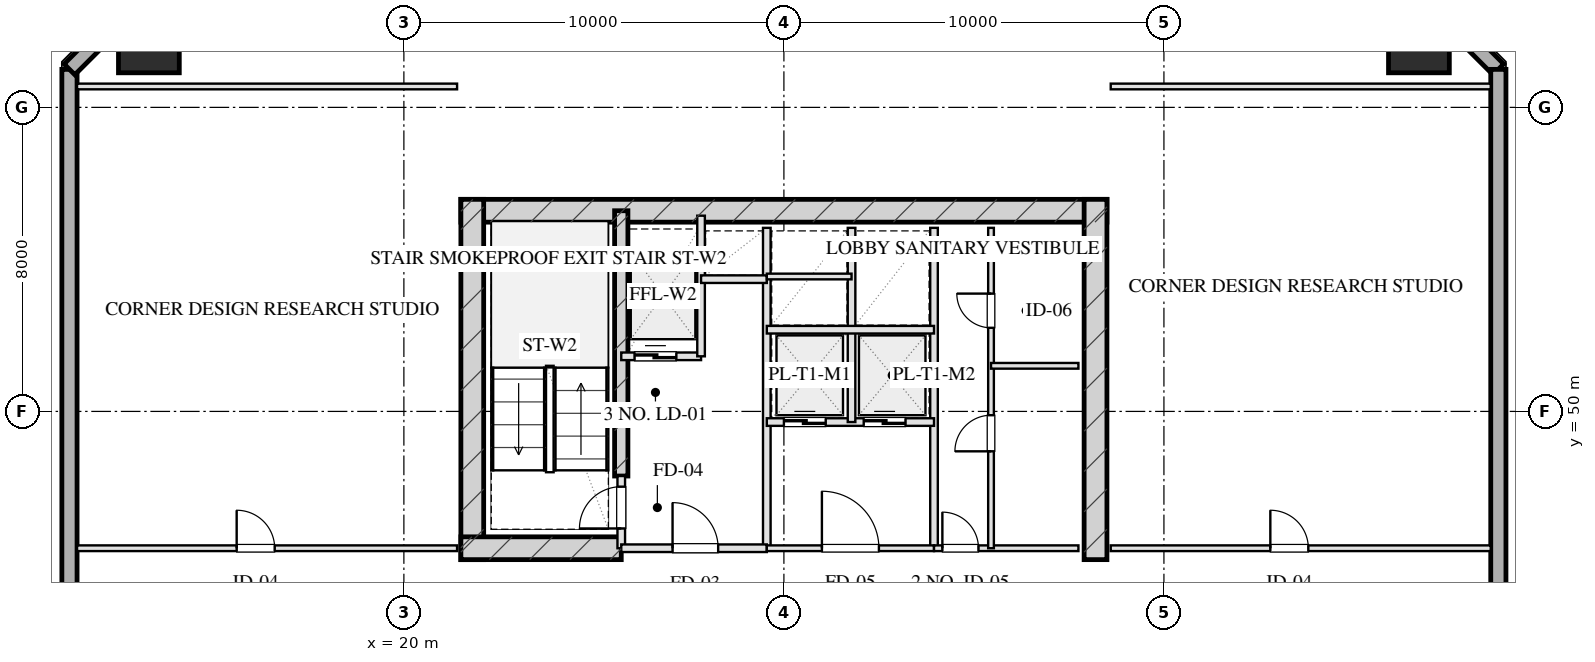
"""IFC4 building model, lengths in metres.
Left out: names, types, materials, properties, quantities, classifications, styles, units other than length and angle.
Written with IfcOpenShell. Run it as: python <this file> out.ifc"""

import sys

from ifc_helpers import new_model, si_unit, direction, frame, frame_2d, origin, origin_2d, place, context, subcontext, project, spatial, rectangle, hollow_rectangle, extrude, element, fill, save


model = new_model("IFC4")
c1 = context("Model", 3, precision=1e-05, world=origin(), true_north=direction((0.0, 1.0)))
c2 = subcontext(c1, "Body", "Model", "MODEL_VIEW")
j1 = project(units=[si_unit("LENGTHUNIT", "METRE"), si_unit("PLANEANGLEUNIT", "RADIAN")], contexts=[c1])
p1 = place(None, origin())
s1 = spatial("IfcSite", under=j1, at=p1, CompositionType="ELEMENT")
p2 = place(p1, origin())
s2 = spatial("IfcBuilding", under=s1, at=p2, CompositionType="ELEMENT")
p3 = place(p2, frame((0.0, 0.0, 127.65)))
s3 = spatial("IfcBuildingStorey", under=s2, at=p3, CompositionType="ELEMENT", Elevation=127.65)
p4 = place(p3, frame((21.5, 55.28, 0.0), z_axis=(0.0, 0.0, 1.0), x_axis=(1.0, 0.0, 0.0)))
e1 = element("IfcWall", 1, at=p4, inside=s3, PredefinedType="SHEAR", context=c2, shape_type="SweptSolid", body=[
    extrude(rectangle(XDim=17.0, YDim=0.6, at=frame_2d((8.5, 0.0))), origin(), (0.0, 0.0, 1.0), 3.45),
])
for number, where, z_axis, x_axis in (
    (2, (21.8, 46.1, 0.0), (0.0, 0.0, 1.0), (0.0, 1.0, 0.0)),
    (3, (38.2, 46.1, 0.0), (0.0, 0.0, 1.0), (0.0, 1.0, 0.0)),
):
    element("IfcWall", number, at=place(p3, frame(where, z_axis=z_axis, x_axis=x_axis)), inside=s3, PredefinedType="SHEAR", context=c2, shape_type="SweptSolid", body=[
        extrude(rectangle(XDim=9.48, YDim=0.6, at=frame_2d((4.74, 0.0))), origin(), (0.0, 0.0, 1.0), 3.45),
    ])
p5 = place(p3, frame((25.72, 48.3, 0.0), z_axis=(0.0, 0.0, 1.0), x_axis=(0.0, 1.0, 0.0)))
e4 = element("IfcWall", 4, at=p5, inside=s3, PredefinedType="SHEAR", context=c2, shape_type="SweptSolid", body=[
    extrude(rectangle(XDim=6.98, YDim=0.35, at=frame_2d((3.49, 0.0))), origin(), (0.0, 0.0, 1.0), 3.45),
])
p6 = place(p3, frame((21.5, 46.4, 0.0), z_axis=(0.0, 0.0, 1.0), x_axis=(1.0, 0.0, 0.0)))
e5 = element("IfcWall", 5, at=p6, inside=s3, PredefinedType="SHEAR", context=c2, shape_type="SweptSolid", body=[
    extrude(rectangle(XDim=4.22, YDim=0.6, at=frame_2d((2.11, 0.0))), origin(), (0.0, 0.0, 1.0), 3.45),
])
for number, where, z_axis, x_axis in (
    (6, (46.71, 59.71, 0.0), (0.0, 0.0, 1.0), (1.0, 0.0, 0.0)),
    (7, (13.29, 59.71, 0.0), (0.0, 0.0, 1.0), (1.0, 0.0, 0.0)),
):
    element("IfcColumn", number, at=place(p3, frame(where, z_axis=z_axis, x_axis=x_axis)), inside=s3, PredefinedType="COLUMN", context=c2, shape_type="SweptSolid", body=[
        extrude(hollow_rectangle(XDim=1.6, YDim=1.6, WallThickness=0.055, at=origin_2d()), origin(), (0.0, 0.0, 1.0), 3.451),
    ])
p7 = place(p3, frame((11.2, 9.0, 0.0), z_axis=(0.0, 0.0, 1.0), x_axis=(0.0, 1.0, 0.0)))
e8 = element("IfcWall", 8, at=p7, inside=s3, PredefinedType="SOLIDWALL", context=c2, shape_type="SweptSolid", body=[
    extrude(rectangle(XDim=50.0, YDim=0.4, at=frame_2d((25.0, 0.0))), origin(), (0.0, 0.0, 1.0), 2.61),
])
p8 = place(p7, frame((17.475, 0.0, 0.75)))
e9 = element("IfcOpeningElement", 9, at=p8, cuts=e8, PredefinedType="OPENING", context=c2, shape_type="SweptSolid", body=[
    extrude(rectangle(XDim=2.25, YDim=1.46, at=frame_2d((1.125, 0.73))), frame((0.0, 0.21, 0.0), z_axis=(0.0, -1.0, 0.0), x_axis=(1.0, 0.0, 0.0)), (0.0, 0.0, 1.0), 0.42),
])
p9 = place(p7, frame((21.275, 0.0, 0.75)))
e10 = element("IfcOpeningElement", 10, at=p9, cuts=e8, PredefinedType="OPENING", context=c2, shape_type="SweptSolid", body=[
    extrude(rectangle(XDim=2.25, YDim=1.46, at=frame_2d((1.125, 0.73))), frame((0.0, 0.21, 0.0), z_axis=(0.0, -1.0, 0.0), x_axis=(1.0, 0.0, 0.0)), (0.0, 0.0, 1.0), 0.42),
])
p10 = place(p7, frame((26.475, 0.0, 0.75)))
e11 = element("IfcOpeningElement", 11, at=p10, cuts=e8, PredefinedType="OPENING", context=c2, shape_type="SweptSolid", body=[
    extrude(rectangle(XDim=2.25, YDim=1.46, at=frame_2d((1.125, 0.73))), frame((0.0, 0.21, 0.0), z_axis=(0.0, -1.0, 0.0), x_axis=(1.0, 0.0, 0.0)), (0.0, 0.0, 1.0), 0.42),
])
p11 = place(p7, frame((30.275, 0.0, 0.75)))
e12 = element("IfcOpeningElement", 12, at=p11, cuts=e8, PredefinedType="OPENING", context=c2, shape_type="SweptSolid", body=[
    extrude(rectangle(XDim=2.25, YDim=1.46, at=frame_2d((1.125, 0.73))), frame((0.0, 0.21, 0.0), z_axis=(0.0, -1.0, 0.0), x_axis=(1.0, 0.0, 0.0)), (0.0, 0.0, 1.0), 0.42),
])
for number, where, z_axis, x_axis in (
    (13, (11.2, 59.0, 0.0), (0.0, 0.0, 1.0), (0.707, 0.707, 0.0)),
    (14, (46.0, 61.8, 0.0), (0.0, 0.0, 1.0), (0.707, -0.707, 0.0)),
):
    element("IfcWall", number, at=place(p3, frame(where, z_axis=z_axis, x_axis=x_axis)), inside=s3, PredefinedType="SOLIDWALL", context=c2, shape_type="SweptSolid", body=[
        extrude(rectangle(XDim=3.96, YDim=0.4, at=frame_2d((1.98, 0.0))), origin(), (0.0, 0.0, 1.0), 2.61),
    ])
p12 = place(p3, frame((48.8, 59.0, 0.0), z_axis=(0.0, 0.0, 1.0), x_axis=(0.0, -1.0, 0.0)))
e15 = element("IfcWall", 15, at=p12, inside=s3, PredefinedType="SOLIDWALL", context=c2, shape_type="SweptSolid", body=[
    extrude(rectangle(XDim=50.0, YDim=0.4, at=frame_2d((25.0, 0.0))), origin(), (0.0, 0.0, 1.0), 2.61),
])
p13 = place(p12, frame((21.275, 0.0, 0.75)))
e16 = element("IfcOpeningElement", 16, at=p13, cuts=e15, PredefinedType="OPENING", context=c2, shape_type="SweptSolid", body=[
    extrude(rectangle(XDim=2.25, YDim=1.46, at=frame_2d((1.125, 0.73))), frame((0.0, 0.21, 0.0), z_axis=(0.0, -1.0, 0.0), x_axis=(1.0, 0.0, 0.0)), (0.0, 0.0, 1.0), 0.42),
])
p14 = place(p12, frame((17.475, 0.0, 0.75)))
e17 = element("IfcOpeningElement", 17, at=p14, cuts=e15, PredefinedType="OPENING", context=c2, shape_type="SweptSolid", body=[
    extrude(rectangle(XDim=2.25, YDim=1.46, at=frame_2d((1.125, 0.73))), frame((0.0, 0.21, 0.0), z_axis=(0.0, -1.0, 0.0), x_axis=(1.0, 0.0, 0.0)), (0.0, 0.0, 1.0), 0.42),
])
p15 = place(p3, frame((25.72, 46.4, 0.0), z_axis=(0.0, 0.0, 1.0), x_axis=(0.0, 1.0, 0.0)))
e18 = element("IfcWall", 18, at=p15, inside=s3, PredefinedType="PARTITIONING", context=c2, shape_type="SweptSolid", body=[
    extrude(rectangle(XDim=1.9, YDim=0.2, at=frame_2d((0.95, 0.0))), origin(), (0.0, 0.0, 1.0), 3.175),
])
p16 = place(p15, frame((0.52, 0.0, 0.0)))
e19 = element("IfcOpeningElement", 19, at=p16, cuts=e18, PredefinedType="OPENING", context=c2, shape_type="SweptSolid", body=[
    extrude(rectangle(XDim=1.1, YDim=2.05, at=frame_2d((0.55, 1.025))), frame((0.0, 0.11, 0.0), z_axis=(0.0, -1.0, 0.0), x_axis=(1.0, 0.0, 0.0)), (0.0, 0.0, 1.0), 0.22),
])
p17 = place(p3, frame((29.55, 46.4, 0.0), z_axis=(0.0, 0.0, 1.0), x_axis=(0.0, 1.0, 0.0)))
e20 = element("IfcWall", 20, at=p17, inside=s3, PredefinedType="PARTITIONING", context=c2, shape_type="SweptSolid", body=[
    extrude(rectangle(XDim=8.43, YDim=0.2, at=frame_2d((4.215, 0.0))), origin(), (0.0, 0.0, 1.0), 3.175),
])
p18 = place(p3, frame((25.72, 46.4, 0.0), z_axis=(0.0, 0.0, 1.0), x_axis=(1.0, 0.0, 0.0)))
e21 = element("IfcWall", 21, at=p18, inside=s3, PredefinedType="PARTITIONING", context=c2, shape_type="SweptSolid", body=[
    extrude(rectangle(XDim=3.83, YDim=0.2, at=frame_2d((1.915, 0.0))), origin(), (0.0, 0.0, 1.0), 3.175),
])
p19 = place(p18, frame((1.35, 0.0, 0.0)))
e22 = element("IfcOpeningElement", 22, at=p19, cuts=e21, PredefinedType="OPENING", context=c2, shape_type="SweptSolid", body=[
    extrude(rectangle(XDim=1.2, YDim=2.05, at=frame_2d((0.6, 1.025))), frame((0.0, 0.11, 0.0), z_axis=(0.0, -1.0, 0.0), x_axis=(1.0, 0.0, 0.0)), (0.0, 0.0, 1.0), 0.22),
])
p20 = place(p3, frame((25.72, 51.45, 0.0), z_axis=(0.0, 0.0, 1.0), x_axis=(1.0, 0.0, 0.0)))
e23 = element("IfcWall", 23, at=p20, inside=s3, PredefinedType="PARTITIONING", context=c2, shape_type="SweptSolid", body=[
    extrude(rectangle(XDim=2.1, YDim=0.2, at=frame_2d((1.05, 0.0))), origin(), (0.0, 0.0, 1.0), 3.175),
])
p21 = place(p20, frame((0.35, 0.0, 0.0)))
e24 = element("IfcOpeningElement", 24, at=p21, cuts=e23, PredefinedType="OPENING", context=c2, shape_type="SweptSolid", body=[
    extrude(rectangle(XDim=1.1, YDim=2.05, at=frame_2d((0.55, 1.025))), frame((0.0, 0.11, 0.0), z_axis=(0.0, -1.0, 0.0), x_axis=(1.0, 0.0, 0.0)), (0.0, 0.0, 1.0), 0.22),
])
p22 = place(p3, frame((27.82, 51.45, 0.0), z_axis=(0.0, 0.0, 1.0), x_axis=(0.0, 1.0, 0.0)))
e25 = element("IfcWall", 25, at=p22, inside=s3, PredefinedType="PARTITIONING", context=c2, shape_type="SweptSolid", body=[
    extrude(rectangle(XDim=3.7, YDim=0.2, at=frame_2d((1.85, 0.0))), origin(), (0.0, 0.0, 1.0), 3.175),
])
p23 = place(p3, frame((27.82, 53.48, 0.0), z_axis=(0.0, 0.0, 1.0), x_axis=(1.0, 0.0, 0.0)))
e26 = element("IfcWall", 26, at=p23, inside=s3, PredefinedType="PARTITIONING", context=c2, shape_type="SweptSolid", body=[
    extrude(rectangle(XDim=1.73, YDim=0.2, at=frame_2d((0.865, 0.0))), origin(), (0.0, 0.0, 1.0), 3.175),
])
p24 = place(p3, frame((33.95, 46.4, 0.0), z_axis=(0.0, 0.0, 1.0), x_axis=(0.0, 1.0, 0.0)))
e27 = element("IfcWall", 27, at=p24, inside=s3, PredefinedType="PARTITIONING", context=c2, shape_type="SweptSolid", body=[
    extrude(rectangle(XDim=8.43, YDim=0.2, at=frame_2d((4.215, 0.0))), origin(), (0.0, 0.0, 1.0), 3.175),
])
p25 = place(p3, frame((29.55, 46.4, 0.0), z_axis=(0.0, 0.0, 1.0), x_axis=(1.0, 0.0, 0.0)))
e28 = element("IfcWall", 28, at=p25, inside=s3, PredefinedType="PARTITIONING", context=c2, shape_type="SweptSolid", body=[
    extrude(rectangle(XDim=4.4, YDim=0.15, at=frame_2d((2.2, 0.0))), origin(), (0.0, 0.0, 1.0), 3.175),
])
p26 = place(p25, frame((1.45, 0.0, 0.0)))
e29 = element("IfcOpeningElement", 29, at=p26, cuts=e28, PredefinedType="OPENING", context=c2, shape_type="SweptSolid", body=[
    extrude(rectangle(XDim=1.5, YDim=2.05, at=frame_2d((0.75, 1.025))), frame((0.0, 0.085, 0.0), z_axis=(0.0, -1.0, 0.0), x_axis=(1.0, 0.0, 0.0)), (0.0, 0.0, 1.0), 0.17),
])
p27 = place(p3, frame((29.55, 49.72, 0.0), z_axis=(0.0, 0.0, 1.0), x_axis=(1.0, 0.0, 0.0)))
e30 = element("IfcWall", 30, at=p27, inside=s3, PredefinedType="PARTITIONING", context=c2, shape_type="SweptSolid", body=[
    extrude(rectangle(XDim=4.4, YDim=0.2, at=frame_2d((2.2, 0.0))), origin(), (0.0, 0.0, 1.0), 3.175),
])
p28 = place(p27, frame((0.45, 0.0, 0.0)))
e31 = element("IfcOpeningElement", 31, at=p28, cuts=e30, PredefinedType="OPENING", context=c2, shape_type="SweptSolid", body=[
    extrude(rectangle(XDim=1.1, YDim=2.05, at=frame_2d((0.55, 1.025))), frame((0.0, 0.11, 0.0), z_axis=(0.0, -1.0, 0.0), x_axis=(1.0, 0.0, 0.0)), (0.0, 0.0, 1.0), 0.22),
])
p29 = place(p27, frame((2.55, 0.0, 0.0)))
e32 = element("IfcOpeningElement", 32, at=p29, cuts=e30, PredefinedType="OPENING", context=c2, shape_type="SweptSolid", body=[
    extrude(rectangle(XDim=1.1, YDim=2.05, at=frame_2d((0.55, 1.025))), frame((0.0, 0.11, 0.0), z_axis=(0.0, -1.0, 0.0), x_axis=(1.0, 0.0, 0.0)), (0.0, 0.0, 1.0), 0.22),
])
p30 = place(p3, frame((31.78, 49.72, 0.0), z_axis=(0.0, 0.0, 1.0), x_axis=(0.0, 1.0, 0.0)))
e33 = element("IfcWall", 33, at=p30, inside=s3, PredefinedType="PARTITIONING", context=c2, shape_type="SweptSolid", body=[
    extrude(rectangle(XDim=5.11, YDim=0.2, at=frame_2d((2.555, 0.0))), origin(), (0.0, 0.0, 1.0), 3.175),
])
p31 = place(p3, frame((29.55, 52.15, 0.0), z_axis=(0.0, 0.0, 1.0), x_axis=(1.0, 0.0, 0.0)))
e34 = element("IfcWall", 34, at=p31, inside=s3, PredefinedType="PARTITIONING", context=c2, shape_type="SweptSolid", body=[
    extrude(rectangle(XDim=4.4, YDim=0.2, at=frame_2d((2.2, 0.0))), origin(), (0.0, 0.0, 1.0), 3.175),
])
p32 = place(p3, frame((29.55, 53.55, 0.0), z_axis=(0.0, 0.0, 1.0), x_axis=(1.0, 0.0, 0.0)))
e35 = element("IfcWall", 35, at=p32, inside=s3, PredefinedType="PARTITIONING", context=c2, shape_type="SweptSolid", body=[
    extrude(rectangle(XDim=2.23, YDim=0.15, at=frame_2d((1.115, 0.0))), origin(), (0.0, 0.0, 1.0), 3.175),
])
p33 = place(p3, frame((33.95, 46.4, 0.0), z_axis=(0.0, 0.0, 1.0), x_axis=(1.0, 0.0, 0.0)))
e36 = element("IfcWall", 36, at=p33, inside=s3, PredefinedType="PARTITIONING", context=c2, shape_type="SweptSolid", body=[
    extrude(rectangle(XDim=3.8, YDim=0.15, at=frame_2d((1.9, 0.0))), origin(), (0.0, 0.0, 1.0), 3.175),
])
p34 = place(p33, frame((0.22, 0.0, 0.0)))
e37 = element("IfcOpeningElement", 37, at=p34, cuts=e36, PredefinedType="OPENING", context=c2, shape_type="SweptSolid", body=[
    extrude(rectangle(XDim=0.95, YDim=2.05, at=frame_2d((0.475, 1.025))), frame((0.0, 0.085, 0.0), z_axis=(0.0, -1.0, 0.0), x_axis=(1.0, 0.0, 0.0)), (0.0, 0.0, 1.0), 0.17),
])
p35 = place(p3, frame((35.45, 46.4, 0.0), z_axis=(0.0, 0.0, 1.0), x_axis=(0.0, 1.0, 0.0)))
e38 = element("IfcWall", 38, at=p35, inside=s3, PredefinedType="PARTITIONING", context=c2, shape_type="SweptSolid", body=[
    extrude(rectangle(XDim=8.43, YDim=0.15, at=frame_2d((4.215, 0.0))), origin(), (0.0, 0.0, 1.0), 2.815),
])
p36 = place(p35, frame((2.55, 0.0, 0.0)))
e39 = element("IfcOpeningElement", 39, at=p36, cuts=e38, PredefinedType="OPENING", context=c2, shape_type="SweptSolid", body=[
    extrude(rectangle(XDim=0.95, YDim=2.05, at=frame_2d((0.475, 1.025))), frame((0.0, 0.085, 0.0), z_axis=(0.0, -1.0, 0.0), x_axis=(1.0, 0.0, 0.0)), (0.0, 0.0, 1.0), 0.17),
])
p37 = place(p35, frame((5.8, 0.0, 0.0)))
e40 = element("IfcOpeningElement", 40, at=p37, cuts=e38, PredefinedType="OPENING", context=c2, shape_type="SweptSolid", body=[
    extrude(rectangle(XDim=0.9, YDim=2.05, at=frame_2d((0.45, 1.025))), frame((0.0, 0.085, 0.0), z_axis=(0.0, -1.0, 0.0), x_axis=(1.0, 0.0, 0.0)), (0.0, 0.0, 1.0), 0.17),
])
p38 = place(p3, frame((35.45, 51.2, 0.0), z_axis=(0.0, 0.0, 1.0), x_axis=(1.0, 0.0, 0.0)))
e41 = element("IfcWall", 41, at=p38, inside=s3, PredefinedType="PARTITIONING", context=c2, shape_type="SweptSolid", body=[
    extrude(rectangle(XDim=2.3, YDim=0.15, at=frame_2d((1.15, 0.0))), origin(), (0.0, 0.0, 1.0), 3.175),
])
p39 = place(p3, frame((11.4, 58.55, 0.0), z_axis=(0.0, 0.0, 1.0), x_axis=(1.0, 0.0, 0.0)))
e42 = element("IfcWall", 42, at=p39, inside=s3, PredefinedType="PARTITIONING", context=c2, shape_type="SweptSolid", body=[
    extrude(rectangle(XDim=10.0, YDim=0.15, at=frame_2d((5.0, 0.0))), origin(), (0.0, 0.0, 1.0), 3.175),
])
p40 = place(p3, frame((11.4, 46.4, 0.0), z_axis=(0.0, 0.0, 1.0), x_axis=(1.0, 0.0, 0.0)))
e43 = element("IfcWall", 43, at=p40, inside=s3, PredefinedType="PARTITIONING", context=c2, shape_type="SweptSolid", body=[
    extrude(rectangle(XDim=10.0, YDim=0.15, at=frame_2d((5.0, 0.0))), origin(), (0.0, 0.0, 1.0), 3.175),
])
p41 = place(p40, frame((4.2, 0.0, 0.0)))
e44 = element("IfcOpeningElement", 44, at=p41, cuts=e43, PredefinedType="OPENING", context=c2, shape_type="SweptSolid", body=[
    extrude(rectangle(XDim=1.0, YDim=2.05, at=frame_2d((0.5, 1.025))), frame((0.0, 0.085, 0.0), z_axis=(0.0, -1.0, 0.0), x_axis=(1.0, 0.0, 0.0)), (0.0, 0.0, 1.0), 0.17),
])
p42 = place(p3, frame((38.6, 58.55, 0.0), z_axis=(0.0, 0.0, 1.0), x_axis=(1.0, 0.0, 0.0)))
e45 = element("IfcWall", 45, at=p42, inside=s3, PredefinedType="PARTITIONING", context=c2, shape_type="SweptSolid", body=[
    extrude(rectangle(XDim=10.0, YDim=0.15, at=frame_2d((5.0, 0.0))), origin(), (0.0, 0.0, 1.0), 3.175),
])
p43 = place(p3, frame((38.6, 46.4, 0.0), z_axis=(0.0, 0.0, 1.0), x_axis=(1.0, 0.0, 0.0)))
e46 = element("IfcWall", 46, at=p43, inside=s3, PredefinedType="PARTITIONING", context=c2, shape_type="SweptSolid", body=[
    extrude(rectangle(XDim=10.0, YDim=0.15, at=frame_2d((5.0, 0.0))), origin(), (0.0, 0.0, 1.0), 3.175),
])
p44 = place(p43, frame((4.2, 0.0, 0.0)))
e47 = element("IfcOpeningElement", 47, at=p44, cuts=e46, PredefinedType="OPENING", context=c2, shape_type="SweptSolid", body=[
    extrude(rectangle(XDim=1.0, YDim=2.05, at=frame_2d((0.5, 1.025))), frame((0.0, 0.085, 0.0), z_axis=(0.0, -1.0, 0.0), x_axis=(1.0, 0.0, 0.0)), (0.0, 0.0, 1.0), 0.17),
])
p45 = place(p16, origin())
e48 = element("IfcDoor", 48, at=p45, inside=s3, OperationType="SINGLE_SWING_LEFT", PredefinedType="DOOR", context=c2, shape_type="SweptSolid", body=[
    extrude(rectangle(XDim=1.1, YDim=2.05, at=frame_2d((0.55, 1.025))), frame((0.0, 0.025, 0.0), z_axis=(0.0, -1.0, 0.0), x_axis=(1.0, 0.0, 0.0)), (0.0, 0.0, 1.0), 0.05),
])
fill(e19, e48)
p46 = place(p19, origin())
e49 = element("IfcDoor", 49, at=p46, inside=s3, OperationType="SINGLE_SWING_LEFT", PredefinedType="DOOR", context=c2, shape_type="SweptSolid", body=[
    extrude(rectangle(XDim=1.2, YDim=2.05, at=frame_2d((0.6, 1.025))), frame((0.0, 0.025, 0.0), z_axis=(0.0, -1.0, 0.0), x_axis=(1.0, 0.0, 0.0)), (0.0, 0.0, 1.0), 0.05),
])
fill(e22, e49)
p47 = place(p21, origin())
e50 = element("IfcDoor", 50, at=p47, inside=s3, OperationType="DOUBLE_DOOR_SLIDING", PredefinedType="DOOR", context=c2, shape_type="SweptSolid", body=[
    extrude(rectangle(XDim=1.1, YDim=2.05, at=frame_2d((0.55, 1.025))), frame((0.0, 0.025, 0.0), z_axis=(0.0, -1.0, 0.0), x_axis=(1.0, 0.0, 0.0)), (0.0, 0.0, 1.0), 0.05),
])
fill(e24, e50)
p48 = place(p26, origin())
e51 = element("IfcDoor", 51, at=p48, inside=s3, OperationType="SINGLE_SWING_LEFT", PredefinedType="DOOR", context=c2, shape_type="SweptSolid", body=[
    extrude(rectangle(XDim=1.5, YDim=2.05, at=frame_2d((0.75, 1.025))), frame((0.0, 0.025, 0.0), z_axis=(0.0, -1.0, 0.0), x_axis=(1.0, 0.0, 0.0)), (0.0, 0.0, 1.0), 0.05),
])
fill(e29, e51)
p49 = place(p28, origin())
e52 = element("IfcDoor", 52, at=p49, inside=s3, OperationType="DOUBLE_DOOR_SLIDING", PredefinedType="DOOR", context=c2, shape_type="SweptSolid", body=[
    extrude(rectangle(XDim=1.1, YDim=2.05, at=frame_2d((0.55, 1.025))), frame((0.0, 0.025, 0.0), z_axis=(0.0, -1.0, 0.0), x_axis=(1.0, 0.0, 0.0)), (0.0, 0.0, 1.0), 0.05),
])
fill(e31, e52)
p50 = place(p29, origin())
e53 = element("IfcDoor", 53, at=p50, inside=s3, OperationType="DOUBLE_DOOR_SLIDING", PredefinedType="DOOR", context=c2, shape_type="SweptSolid", body=[
    extrude(rectangle(XDim=1.1, YDim=2.05, at=frame_2d((0.55, 1.025))), frame((0.0, 0.025, 0.0), z_axis=(0.0, -1.0, 0.0), x_axis=(1.0, 0.0, 0.0)), (0.0, 0.0, 1.0), 0.05),
])
fill(e32, e53)
p51 = place(p34, origin())
e54 = element("IfcDoor", 54, at=p51, inside=s3, OperationType="SINGLE_SWING_LEFT", PredefinedType="DOOR", context=c2, shape_type="SweptSolid", body=[
    extrude(rectangle(XDim=0.95, YDim=2.05, at=frame_2d((0.475, 1.025))), frame((0.0, 0.025, 0.0), z_axis=(0.0, -1.0, 0.0), x_axis=(1.0, 0.0, 0.0)), (0.0, 0.0, 1.0), 0.05),
])
fill(e37, e54)
p52 = place(p36, origin())
e55 = element("IfcDoor", 55, at=p52, inside=s3, OperationType="SINGLE_SWING_LEFT", PredefinedType="DOOR", context=c2, shape_type="SweptSolid", body=[
    extrude(rectangle(XDim=0.95, YDim=2.05, at=frame_2d((0.475, 1.025))), frame((0.0, 0.025, 0.0), z_axis=(0.0, -1.0, 0.0), x_axis=(1.0, 0.0, 0.0)), (0.0, 0.0, 1.0), 0.05),
])
fill(e39, e55)
p53 = place(p37, origin())
e56 = element("IfcDoor", 56, at=p53, inside=s3, OperationType="SINGLE_SWING_RIGHT", PredefinedType="DOOR", context=c2, shape_type="SweptSolid", body=[
    extrude(rectangle(XDim=0.9, YDim=2.05, at=frame_2d((0.45, 1.025))), frame((0.0, 0.025, 0.0), z_axis=(0.0, -1.0, 0.0), x_axis=(1.0, 0.0, 0.0)), (0.0, 0.0, 1.0), 0.05),
])
fill(e40, e56)
p54 = place(p41, origin())
e57 = element("IfcDoor", 57, at=p54, inside=s3, OperationType="SINGLE_SWING_LEFT", PredefinedType="DOOR", context=c2, shape_type="SweptSolid", body=[
    extrude(rectangle(XDim=1.0, YDim=2.05, at=frame_2d((0.5, 1.025))), frame((0.0, 0.025, 0.0), z_axis=(0.0, -1.0, 0.0), x_axis=(1.0, 0.0, 0.0)), (0.0, 0.0, 1.0), 0.05),
])
fill(e44, e57)
p55 = place(p44, origin())
e58 = element("IfcDoor", 58, at=p55, inside=s3, OperationType="SINGLE_SWING_LEFT", PredefinedType="DOOR", context=c2, shape_type="SweptSolid", body=[
    extrude(rectangle(XDim=1.0, YDim=2.05, at=frame_2d((0.5, 1.025))), frame((0.0, 0.025, 0.0), z_axis=(0.0, -1.0, 0.0), x_axis=(1.0, 0.0, 0.0)), (0.0, 0.0, 1.0), 0.05),
])
fill(e47, e58)
save(model, sys.argv[1])
